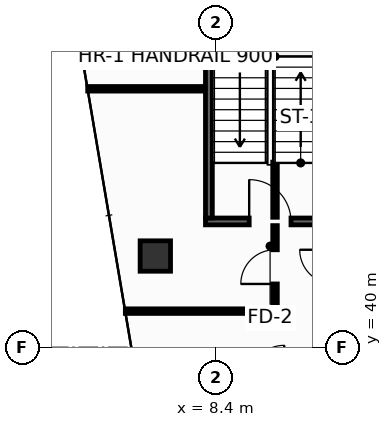
"""IFC4 building model, lengths in metres.
Left out: names, types, materials, properties, quantities, classifications, styles, units other than length and angle.
Written with IfcOpenShell. Run it as: python <this file> out.ifc"""

import sys

from ifc_helpers import new_model, si_unit, direction, frame, frame_2d, origin, origin_2d, place, context, subcontext, project, spatial, rectangle, hollow_rectangle, extrude, element, fill, save


model = new_model("IFC4")
c1 = context("Model", 3, precision=1e-05, world=origin(), true_north=direction((0.0, 1.0)))
c2 = subcontext(c1, "Body", "Model", "MODEL_VIEW")
j1 = project(units=[si_unit("LENGTHUNIT", "METRE"), si_unit("PLANEANGLEUNIT", "RADIAN")], contexts=[c1])
p1 = place(None, origin())
s1 = spatial("IfcSite", under=j1, at=p1, CompositionType="ELEMENT")
p2 = place(p1, origin())
s2 = spatial("IfcBuilding", under=s1, at=p2, CompositionType="ELEMENT")
p3 = place(p2, frame((0.0, 0.0, 186.6)))
s3 = spatial("IfcBuildingStorey", under=s2, at=p3, CompositionType="ELEMENT", Elevation=186.6)
p4 = place(p3, frame((6.8, 42.4, 0.0), z_axis=(0.0, 0.0, 1.0), x_axis=(1.0, 0.0, 0.0)))
e1 = element("IfcColumn", 1, at=p4, inside=s3, PredefinedType="COLUMN", context=c2, shape_type="SweptSolid", body=[
    extrude(hollow_rectangle(XDim=0.8, YDim=0.8, WallThickness=0.036, at=origin_2d()), origin(), (0.0, 0.0, 1.0), 3.8),
])
p5 = place(p3, frame((8.12, 43.31, 0.0), z_axis=(0.0, 0.0, 1.0), x_axis=(1.0, 0.0, 0.0)))
e2 = element("IfcWall", 2, at=p5, inside=s3, PredefinedType="SHEAR", context=c2, shape_type="SweptSolid", body=[
    extrude(rectangle(XDim=3.41, YDim=0.18, at=frame_2d((1.705, 0.0))), origin(), (0.0, 0.0, 1.0), 3.55),
])
p6 = place(p5, frame((1.15, 0.0, 0.0)))
e3 = element("IfcOpeningElement", 3, at=p6, cuts=e2, PredefinedType="OPENING", context=c2, shape_type="SweptSolid", body=[
    extrude(rectangle(XDim=1.1, YDim=2.15, at=frame_2d((0.55, 1.075))), frame((0.0, 0.1, 0.0), z_axis=(0.0, -1.0, 0.0), x_axis=(1.0, 0.0, 0.0)), (0.0, 0.0, 1.0), 0.2),
])
p7 = place(p3, frame((8.21, 53.8, 0.0), z_axis=(0.0, 0.0, 1.0), x_axis=(0.0, -1.0, 0.0)))
e4 = element("IfcWall", 4, at=p7, inside=s3, PredefinedType="SHEAR", context=c2, shape_type="SweptSolid", body=[
    extrude(rectangle(XDim=10.4, YDim=0.18, at=frame_2d((5.2, 0.0))), origin(), (0.0, 0.0, 1.0), 3.55),
])
p8 = place(p3, frame((6.011, 40.95, 0.0), z_axis=(0.0, 0.0, 1.0), x_axis=(1.0, 0.0, 0.0)))
e5 = element("IfcWall", 5, at=p8, inside=s3, PredefinedType="PARTITIONING", context=c2, shape_type="SweptSolid", body=[
    extrude(rectangle(XDim=3.939, YDim=0.12, at=frame_2d((1.969, 0.0))), origin(), (0.0, 0.0, 1.0), 3.035),
])
p9 = place(p3, frame((5.021, 46.8, 0.0), z_axis=(0.0, 0.0, 1.0), x_axis=(1.0, 0.0, 0.0)))
e6 = element("IfcWall", 6, at=p9, inside=s3, PredefinedType="PARTITIONING", context=c2, shape_type="SweptSolid", body=[
    extrude(rectangle(XDim=3.079, YDim=0.12, at=frame_2d((1.54, 0.0))), origin(), (0.0, 0.0, 1.0), 2.835),
])
p10 = place(p3, frame((9.95, 41.03, 0.0), z_axis=(0.0, 0.0, 1.0), x_axis=(0.0, 1.0, 0.0)))
e7 = element("IfcWall", 7, at=p10, inside=s3, PredefinedType="PARTITIONING", context=c2, shape_type="SweptSolid", body=[
    extrude(rectangle(XDim=2.17, YDim=0.12, at=frame_2d((1.085, 0.0))), origin(), (0.0, 0.0, 1.0), 2.835),
])
p11 = place(p10, frame((0.635, 0.0, 0.0)))
e8 = element("IfcOpeningElement", 8, at=p11, cuts=e7, PredefinedType="OPENING", context=c2, shape_type="SweptSolid", body=[
    extrude(rectangle(XDim=0.9, YDim=2.1, at=frame_2d((0.45, 1.05))), frame((0.0, 0.07, 0.0), z_axis=(0.0, -1.0, 0.0), x_axis=(1.0, 0.0, 0.0)), (0.0, 0.0, 1.0), 0.14),
])
p12 = place(p3, frame((9.95, 43.42, 0.0), z_axis=(0.0, 0.0, 1.0), x_axis=(0.0, 1.0, 0.0)))
e9 = element("IfcWall", 9, at=p12, inside=s3, PredefinedType="PARTITIONING", context=c2, shape_type="SweptSolid", body=[
    extrude(rectangle(XDim=1.45, YDim=0.12, at=frame_2d((0.725, 0.0))), origin(), (0.0, 0.0, 1.0), 3.55),
])
p13 = place(p6, origin())
e10 = element("IfcDoor", 10, at=p13, inside=s3, OperationType="SINGLE_SWING_LEFT", PredefinedType="DOOR", context=c2, shape_type="SweptSolid", body=[
    extrude(rectangle(XDim=1.1, YDim=2.15, at=frame_2d((0.55, 1.075))), frame((0.0, 0.025, 0.0), z_axis=(0.0, -1.0, 0.0), x_axis=(1.0, 0.0, 0.0)), (0.0, 0.0, 1.0), 0.05),
])
fill(e3, e10)
p14 = place(p11, origin())
e11 = element("IfcDoor", 11, at=p14, inside=s3, OperationType="SINGLE_SWING_LEFT", PredefinedType="DOOR", context=c2, shape_type="SweptSolid", body=[
    extrude(rectangle(XDim=0.9, YDim=2.1, at=frame_2d((0.45, 1.05))), frame((0.0, 0.025, 0.0), z_axis=(0.0, -1.0, 0.0), x_axis=(1.0, 0.0, 0.0)), (0.0, 0.0, 1.0), 0.05),
])
fill(e8, e11)
save(model, sys.argv[1])
